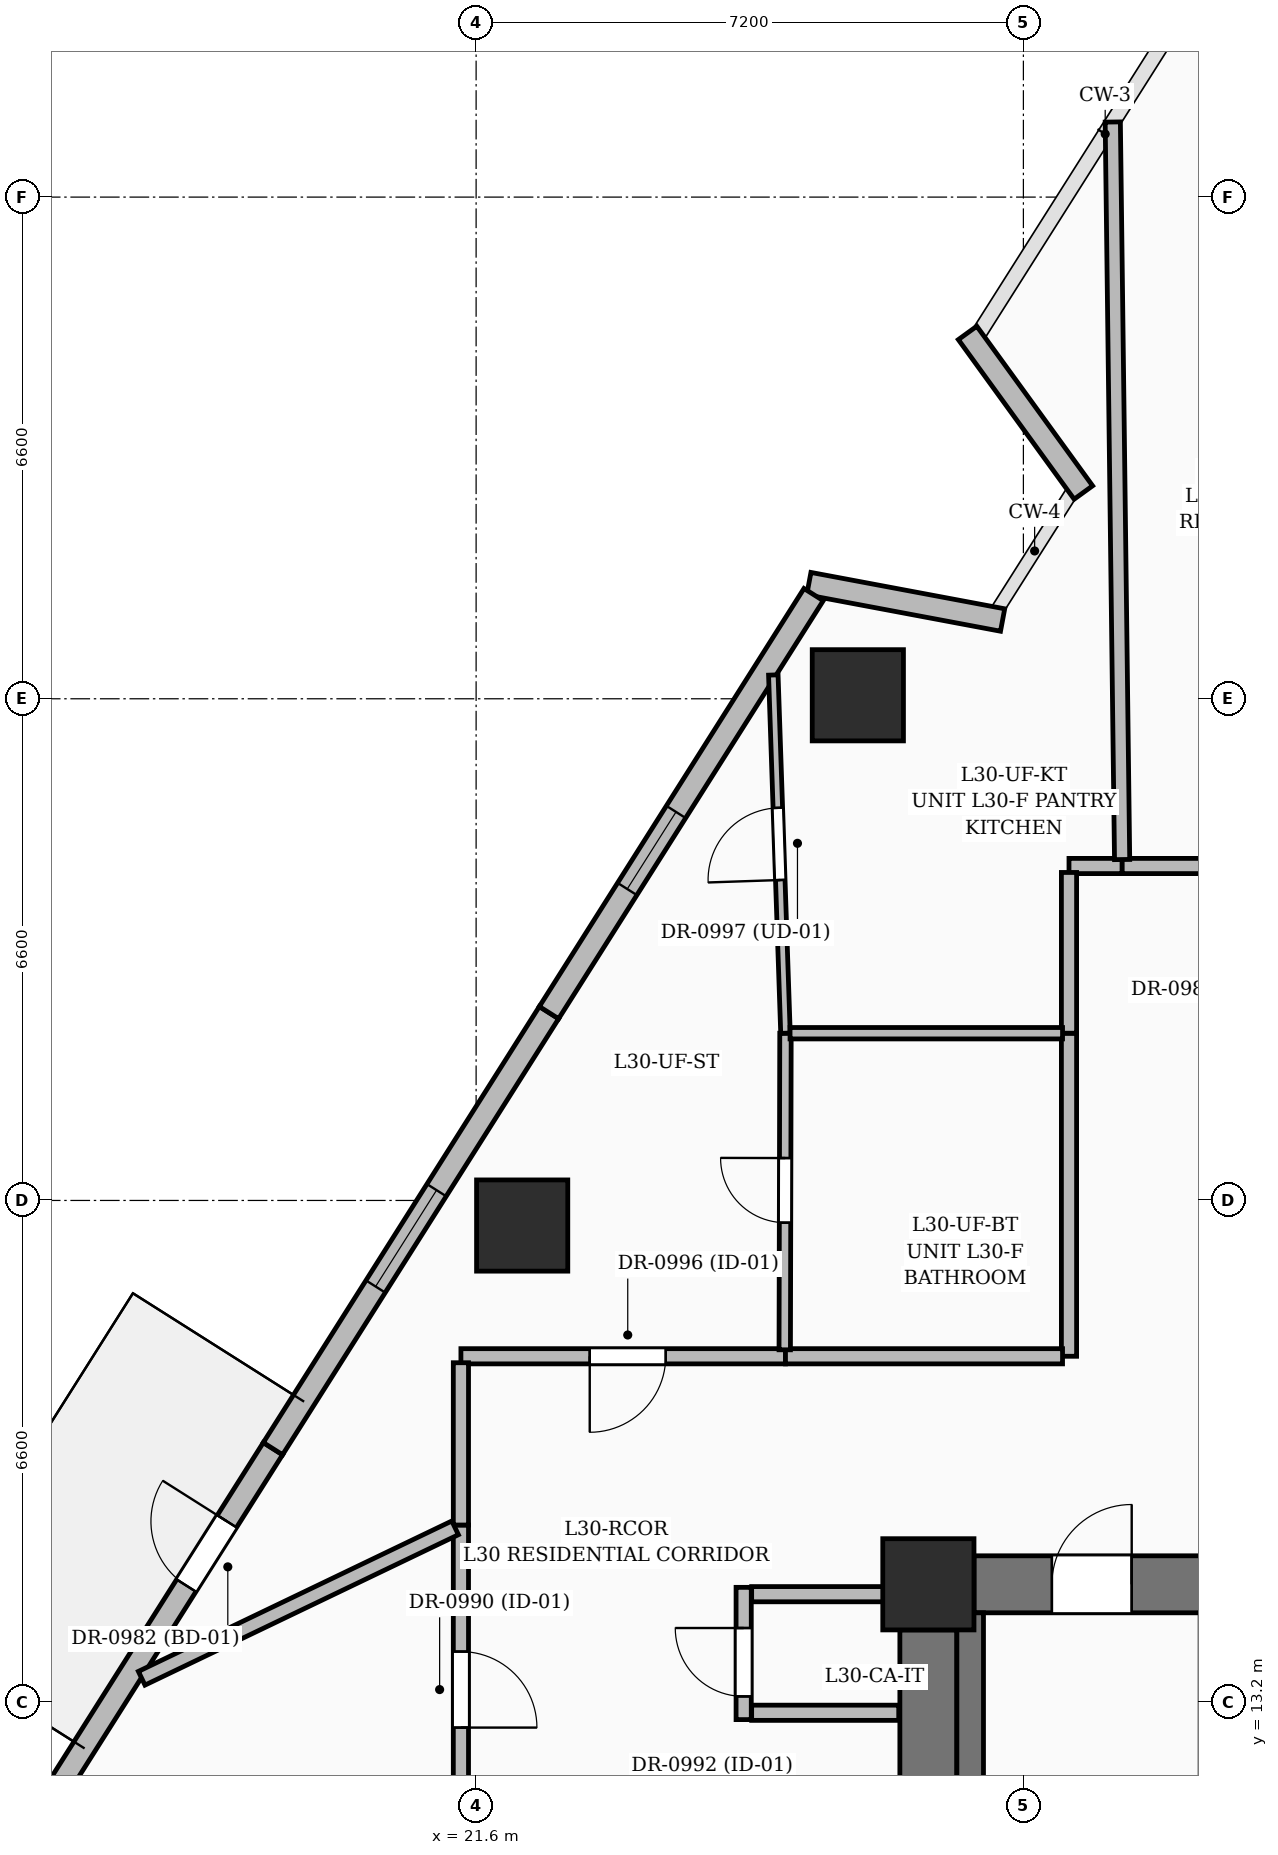
"""IFC4 building model, lengths in metres.
Left out: names, types, materials, properties, quantities, classifications, styles, units other than length and angle.
Written with IfcOpenShell. Run it as: python <this file> out.ifc"""

import sys

from ifc_helpers import new_model, si_unit, direction, frame, frame_2d, origin, origin_2d, place, context, subcontext, project, spatial, rectangle, extrude, element, fill, save


model = new_model("IFC4")
c1 = context("Model", 3, precision=1e-05, world=origin(), true_north=direction((0.0, 1.0)))
c2 = subcontext(c1, "Body", "Model", "MODEL_VIEW")
j1 = project(units=[si_unit("LENGTHUNIT", "METRE"), si_unit("PLANEANGLEUNIT", "RADIAN")], contexts=[c1])
p1 = place(None, origin())
s1 = spatial("IfcSite", under=j1, at=p1, CompositionType="ELEMENT")
p2 = place(p1, origin())
s2 = spatial("IfcBuilding", under=s1, at=p2, CompositionType="ELEMENT")
p3 = place(p2, frame((0.0, 0.0, 121.2)))
s3 = spatial("IfcBuildingStorey", under=s2, at=p3, CompositionType="ELEMENT", Elevation=121.2)
p4 = place(p3, frame((27.55, 14.75, 0.0), z_axis=(0.0, 0.0, 1.0), x_axis=(1.0, 0.0, 0.0)))
e1 = element("IfcColumn", 1, at=p4, inside=s3, PredefinedType="COLUMN", context=c2, shape_type="SweptSolid", body=[
    extrude(rectangle(XDim=1.2, YDim=1.2, at=origin_2d()), origin(), (0.0, 0.0, 1.0), 3.6),
])
p5 = place(p3, frame((28.15, 14.75, 0.0), z_axis=(0.0, 0.0, 1.0), x_axis=(1.0, 0.0, 0.0)))
e2 = element("IfcWall", 2, at=p5, inside=s3, PredefinedType="SHEAR", context=c2, shape_type="SweptSolid", body=[
    extrude(rectangle(XDim=6.4, YDim=0.75, at=frame_2d((3.2, 0.0))), origin(), (0.0, 0.0, 1.0), 3.6),
])
p6 = place(p5, frame((1.025, 0.0, 0.0)))
e3 = element("IfcOpeningElement", 3, at=p6, cuts=e2, PredefinedType="OPENING", context=c2, shape_type="SweptSolid", body=[
    extrude(rectangle(XDim=1.05, YDim=2.15, at=frame_2d((0.525, 1.075))), frame((0.0, 0.385, 0.0), z_axis=(0.0, -1.0, 0.0), x_axis=(1.0, 0.0, 0.0)), (0.0, 0.0, 1.0), 0.77),
])
p7 = place(p5, frame((3.8, 0.0, 0.0)))
e4 = element("IfcOpeningElement", 4, at=p7, cuts=e2, PredefinedType="OPENING", context=c2, shape_type="SweptSolid", body=[
    extrude(rectangle(XDim=1.1, YDim=2.2, at=frame_2d((0.55, 1.1))), frame((0.0, 0.385, 0.0), z_axis=(0.0, -1.0, 0.0), x_axis=(1.0, 0.0, 0.0)), (0.0, 0.0, 1.0), 0.77),
])
p8 = place(p3, frame((27.55, 5.15, 0.0), z_axis=(0.0, 0.0, 1.0), x_axis=(0.0, 1.0, 0.0)))
e5 = element("IfcWall", 5, at=p8, inside=s3, PredefinedType="SHEAR", context=c2, shape_type="SweptSolid", body=[
    extrude(rectangle(XDim=9.0, YDim=0.75, at=frame_2d((4.5, 0.0))), origin(), (0.0, 0.0, 1.0), 3.6),
])
p9 = place(p3, frame((28.1, 5.2, 0.0), z_axis=(0.0, 0.0, 1.0), x_axis=(0.0, 1.0, 0.0)))
e6 = element("IfcWall", 6, at=p9, inside=s3, PredefinedType="SOLIDWALL", context=c2, shape_type="SweptSolid", body=[
    extrude(rectangle(XDim=9.175, YDim=0.35, at=frame_2d((4.587, 0.0))), origin(), (0.0, 0.0, 1.0), 3.6),
])
for number, where, z_axis, x_axis in (
    (7, (26.622, 26.446, 0.0), (0.0, 0.0, 1.0), (1.0, 0.0, 0.0)),
    (8, (22.206, 19.47, 0.0), (0.0, 0.0, 1.0), (1.0, 0.0, 0.0)),
):
    element("IfcColumn", number, at=place(p3, frame(where, z_axis=z_axis, x_axis=x_axis)), inside=s3, PredefinedType="COLUMN", context=c2, shape_type="SweptSolid", body=[
        extrude(rectangle(XDim=1.2, YDim=1.2, at=origin_2d()), origin(), (0.0, 0.0, 1.0), 3.6),
    ])
p10 = place(p3, frame((25.977, 27.915, 0.0), z_axis=(0.0, 0.0, 1.0), x_axis=(0.982835939335, -0.184481750728, 0.0)))
e9 = element("IfcWall", 9, at=p10, inside=s3, PredefinedType="SOLIDWALL", context=c2, shape_type="SweptSolid", body=[
    extrude(rectangle(XDim=2.594, YDim=0.3, at=frame_2d((1.297, 0.0))), origin(), (0.0, 0.0, 1.0), 2.575),
])
p11 = place(p3, frame((29.589, 29.114, 0.0), z_axis=(0.0, 0.0, 1.0), x_axis=(-0.587214315037, 0.809431496926, 0.0)))
e10 = element("IfcWall", 10, at=p11, inside=s3, PredefinedType="SOLIDWALL", context=c2, shape_type="SweptSolid", body=[
    extrude(rectangle(XDim=2.594, YDim=0.3, at=frame_2d((1.297, 0.0))), origin(), (0.0, 0.0, 1.0), 2.575),
])
p12 = place(p3, frame((15.296, 10.798, 0.0), z_axis=(0.0, 0.0, 1.0), x_axis=(0.534877542647, 0.84492959137, 0.0)))
e11 = element("IfcWall", 11, at=p12, inside=s3, PredefinedType="SOLIDWALL", context=c2, shape_type="SweptSolid", body=[
    extrude(rectangle(XDim=6.789, YDim=0.3, at=frame_2d((3.395, 0.0))), origin(), (0.0, 0.0, 1.0), 3.35),
])
p13 = place(p12, frame((4.658, 0.0, 0.0)))
e12 = element("IfcOpeningElement", 12, at=p13, cuts=e11, PredefinedType="OPENING", context=c2, shape_type="SweptSolid", body=[
    extrude(rectangle(XDim=1.0, YDim=2.2, at=frame_2d((0.5, 1.1))), frame((0.0, 0.16, 0.0), z_axis=(0.0, -1.0, 0.0), x_axis=(1.0, 0.0, 0.0)), (0.0, 0.0, 1.0), 0.32),
])
p14 = place(p3, frame((18.927, 16.534, 0.0), z_axis=(0.0, 0.0, 1.0), x_axis=(0.534886962815, 0.844923627916, 0.0)))
e13 = element("IfcWall", 13, at=p14, inside=s3, PredefinedType="SOLIDWALL", context=c2, shape_type="SweptSolid", body=[
    extrude(rectangle(XDim=6.79, YDim=0.3, at=frame_2d((3.395, 0.0))), origin(), (0.0, 0.0, 1.0), 3.35),
])
p15 = place(p14, frame((2.525, 0.0, 0.6)))
e14 = element("IfcOpeningElement", 14, at=p15, cuts=e13, PredefinedType="OPENING", context=c2, shape_type="SweptSolid", body=[
    extrude(rectangle(XDim=1.5, YDim=2.1, at=frame_2d((0.75, 1.05))), frame((0.0, 0.16, 0.0), z_axis=(0.0, -1.0, 0.0), x_axis=(1.0, 0.0, 0.0)), (0.0, 0.0, 1.0), 0.32),
])
p16 = place(p3, frame((22.559, 22.271, 0.0), z_axis=(0.0, 0.0, 1.0), x_axis=(0.534862000087, 0.844939430292, 0.0)))
e15 = element("IfcWall", 15, at=p16, inside=s3, PredefinedType="SOLIDWALL", context=c2, shape_type="SweptSolid", body=[
    extrude(rectangle(XDim=6.509, YDim=0.3, at=frame_2d((3.254, 0.0))), origin(), (0.0, 0.0, 1.0), 3.35),
])
p17 = place(p16, frame((1.925, 0.0, 0.8)))
e16 = element("IfcOpeningElement", 16, at=p17, cuts=e15, PredefinedType="OPENING", context=c2, shape_type="SweptSolid", body=[
    extrude(rectangle(XDim=1.2, YDim=1.8, at=frame_2d((0.6, 0.9))), frame((0.0, 0.16, 0.0), z_axis=(0.0, -1.0, 0.0), x_axis=(1.0, 0.0, 0.0)), (0.0, 0.0, 1.0), 0.32),
])
p18 = place(p3, frame((25.12, 12.97, 0.0), z_axis=(0.0, 0.0, 1.0), x_axis=(0.0, 1.0, 0.0)))
e17 = element("IfcWall", 17, at=p18, inside=s3, PredefinedType="PARTITIONING", context=c2, shape_type="SweptSolid", body=[
    extrude(rectangle(XDim=1.74, YDim=0.2, at=frame_2d((0.87, 0.0))), origin(), (0.0, 0.0, 1.0), 3.35),
])
p19 = place(p18, frame((0.305, 0.0, 0.0)))
e18 = element("IfcOpeningElement", 18, at=p19, cuts=e17, PredefinedType="OPENING", context=c2, shape_type="SweptSolid", body=[
    extrude(rectangle(XDim=0.9, YDim=2.1, at=frame_2d((0.45, 1.05))), frame((0.0, 0.11, 0.0), z_axis=(0.0, -1.0, 0.0), x_axis=(1.0, 0.0, 0.0)), (0.0, 0.0, 1.0), 0.22),
])
for number, where, z_axis, x_axis in (
    (19, (25.225, 14.62, 0.0), (0.0, 0.0, 1.0), (1.0, 0.0, 0.0)),
    (20, (25.225, 13.06, 0.0), (0.0, 0.0, 1.0), (1.0, 0.0, 0.0)),
):
    element("IfcWall", number, at=place(p3, frame(where, z_axis=z_axis, x_axis=x_axis)), inside=s3, PredefinedType="PARTITIONING", context=c2, shape_type="SweptSolid", body=[
        extrude(rectangle(XDim=1.935, YDim=0.2, at=frame_2d((0.967, 0.0))), origin(), (0.0, 0.0, 1.0), 3.35),
    ])
p20 = place(p3, frame((21.4, 15.53, 0.0), z_axis=(0.0, 0.0, 1.0), x_axis=(0.0, -1.0, 0.0)))
e21 = element("IfcWall", 21, at=p20, inside=s3, PredefinedType="PARTITIONING", context=c2, shape_type="SweptSolid", body=[
    extrude(rectangle(XDim=4.33, YDim=0.2, at=frame_2d((2.165, 0.0))), origin(), (0.0, 0.0, 1.0), 2.787),
])
p21 = place(p20, frame((1.665, 0.0, 0.0)))
e22 = element("IfcOpeningElement", 22, at=p21, cuts=e21, PredefinedType="OPENING", context=c2, shape_type="SweptSolid", body=[
    extrude(rectangle(XDim=1.0, YDim=2.2, at=frame_2d((0.5, 1.1))), frame((0.0, 0.11, 0.0), z_axis=(0.0, -1.0, 0.0), x_axis=(1.0, 0.0, 0.0)), (0.0, 0.0, 1.0), 0.22),
])
p22 = place(p3, frame((25.67, 17.75, 0.0), z_axis=(0.0, 0.0, 1.0), x_axis=(-1.0, 0.0, 0.0)))
e23 = element("IfcWall", 23, at=p22, inside=s3, PredefinedType="PARTITIONING", context=c2, shape_type="SweptSolid", body=[
    extrude(rectangle(XDim=4.27, YDim=0.2, at=frame_2d((2.135, 0.0))), origin(), (0.0, 0.0, 1.0), 2.372),
])
p23 = place(p22, frame((1.575, 0.0, 0.0)))
e24 = element("IfcOpeningElement", 24, at=p23, cuts=e23, PredefinedType="OPENING", context=c2, shape_type="SweptSolid", body=[
    extrude(rectangle(XDim=1.0, YDim=2.2, at=frame_2d((0.5, 1.1))), frame((0.0, 0.11, 0.0), z_axis=(0.0, -1.0, 0.0), x_axis=(1.0, 0.0, 0.0)), (0.0, 0.0, 1.0), 0.22),
])
p24 = place(p3, frame((21.4, 17.665, 0.0), z_axis=(0.0, 0.0, 1.0), x_axis=(0.0, -1.0, 0.0)))
e25 = element("IfcWall", 25, at=p24, inside=s3, PredefinedType="PARTITIONING", context=c2, shape_type="SweptSolid", body=[
    extrude(rectangle(XDim=2.135, YDim=0.2, at=frame_2d((1.067, 0.0))), origin(), (0.0, 0.0, 1.0), 2.57),
])
p25 = place(p3, frame((29.4, 22.0, 0.0), z_axis=(0.0, 0.0, 1.0), x_axis=(0.0, -1.0, 0.0)))
e26 = element("IfcWall", 26, at=p25, inside=s3, PredefinedType="PARTITIONING", context=c2, shape_type="SweptSolid", body=[
    extrude(rectangle(XDim=4.25, YDim=0.2, at=frame_2d((2.125, 0.0))), origin(), (0.0, 0.0, 1.0), 2.787),
])
p26 = place(p3, frame((29.315, 17.75, 0.0), z_axis=(0.0, 0.0, 1.0), x_axis=(-1.0, 0.0, 0.0)))
e27 = element("IfcWall", 27, at=p26, inside=s3, PredefinedType="PARTITIONING", context=c2, shape_type="SweptSolid", body=[
    extrude(rectangle(XDim=3.645, YDim=0.2, at=frame_2d((1.823, 0.0))), origin(), (0.0, 0.0, 1.0), 2.787),
])
p27 = place(p3, frame((30.1, 24.2, 0.0), z_axis=(0.0, 0.0, 1.0), x_axis=(-1.0, 0.0, 0.0)))
e28 = element("IfcWall", 28, at=p27, inside=s3, PredefinedType="PARTITIONING", context=c2, shape_type="SweptSolid", body=[
    extrude(rectangle(XDim=0.7, YDim=0.2, at=frame_2d((0.35, 0.0))), origin(), (0.0, 0.0, 1.0), 3.35),
])
p28 = place(p3, frame((29.4, 24.115, 0.0), z_axis=(0.0, 0.0, 1.0), x_axis=(0.0, -1.0, 0.0)))
e29 = element("IfcWall", 29, at=p28, inside=s3, PredefinedType="PARTITIONING", context=c2, shape_type="SweptSolid", body=[
    extrude(rectangle(XDim=2.115, YDim=0.2, at=frame_2d((1.058, 0.0))), origin(), (0.0, 0.0, 1.0), 2.372),
])
p29 = place(p3, frame((31.865, 24.2, 0.0), z_axis=(0.0, 0.0, 1.0), x_axis=(-1.0, 0.0, 0.0)))
e30 = element("IfcWall", 30, at=p29, inside=s3, PredefinedType="PARTITIONING", context=c2, shape_type="SweptSolid", body=[
    extrude(rectangle(XDim=1.765, YDim=0.2, at=frame_2d((0.882, 0.0))), origin(), (0.0, 0.0, 1.0), 2.787),
])
p30 = place(p3, frame((21.324, 15.493, 0.0), z_axis=(0.0, 0.0, 1.0), x_axis=(-0.901578855608, -0.432614802244, 0.0)))
e31 = element("IfcWall", 31, at=p30, inside=s3, PredefinedType="PARTITIONING", context=c2, shape_type="SweptSolid", body=[
    extrude(rectangle(XDim=4.574, YDim=0.2, at=frame_2d((2.287, 0.0))), origin(), (0.0, 0.0, 1.0), 2.57),
])
p31 = place(p3, frame((25.66, 17.835, 0.0), z_axis=(0.0, 0.0, 1.0), x_axis=(0.00234465944, 0.999997251282, 0.0)))
e32 = element("IfcWall", 32, at=p31, inside=s3, PredefinedType="PARTITIONING", context=c2, shape_type="SweptSolid", body=[
    extrude(rectangle(XDim=4.165, YDim=0.15, at=frame_2d((2.083, 0.0))), origin(), (0.0, 0.0, 1.0), 2.787),
])
p32 = place(p31, frame((1.673, 0.0, 0.0)))
e33 = element("IfcOpeningElement", 33, at=p32, cuts=e32, PredefinedType="OPENING", context=c2, shape_type="SweptSolid", body=[
    extrude(rectangle(XDim=0.85, YDim=2.1, at=frame_2d((0.425, 1.05))), frame((0.0, 0.085, 0.0), z_axis=(0.0, -1.0, 0.0), x_axis=(1.0, 0.0, 0.0)), (0.0, 0.0, 1.0), 0.17),
])
p33 = place(p3, frame((25.67, 22.0, 0.0), z_axis=(0.0, 0.0, 1.0), x_axis=(-0.033911276159, 0.999424847274, 0.0)))
e34 = element("IfcWall", 34, at=p33, inside=s3, PredefinedType="PARTITIONING", context=c2, shape_type="SweptSolid", body=[
    extrude(rectangle(XDim=4.716, YDim=0.125, at=frame_2d((2.358, 0.0))), origin(), (0.0, 0.0, 1.0), 2.57),
])
p34 = place(p33, frame((2.017, 0.0, 0.0)))
e35 = element("IfcOpeningElement", 35, at=p34, cuts=e34, PredefinedType="OPENING", context=c2, shape_type="SweptSolid", body=[
    extrude(rectangle(XDim=0.95, YDim=2.2, at=frame_2d((0.475, 1.1))), frame((0.0, 0.072, 0.0), z_axis=(0.0, -1.0, 0.0), x_axis=(1.0, 0.0, 0.0)), (0.0, 0.0, 1.0), 0.145),
])
p35 = place(p3, frame((29.315, 22.0, 0.0), z_axis=(0.0, 0.0, 1.0), x_axis=(-1.0, 0.0, 0.0)))
e36 = element("IfcWall", 36, at=p35, inside=s3, PredefinedType="PARTITIONING", context=c2, shape_type="SweptSolid", body=[
    extrude(rectangle(XDim=3.585, YDim=0.15, at=frame_2d((1.792, 0.0))), origin(), (0.0, 0.0, 1.0), 2.787),
])
p36 = place(p3, frame((30.099, 24.285, 0.0), z_axis=(0.0, 0.0, 1.0), x_axis=(-0.012654984929, 0.999919922472, 0.0)))
e37 = element("IfcWall", 37, at=p36, inside=s3, PredefinedType="PARTITIONING", context=c2, shape_type="SweptSolid", body=[
    extrude(rectangle(XDim=9.704, YDim=0.2, at=frame_2d((4.852, 0.0))), origin(), (0.0, 0.0, 1.0), 2.57),
])
p37 = place(p13, origin())
e38 = element("IfcDoor", 38, at=p37, inside=s3, OperationType="SINGLE_SWING_RIGHT", PredefinedType="DOOR", context=c2, shape_type="SweptSolid", body=[
    extrude(rectangle(XDim=1.0, YDim=2.2, at=frame_2d((0.5, 1.1))), frame((0.0, 0.025, 0.0), z_axis=(0.0, -1.0, 0.0), x_axis=(1.0, 0.0, 0.0)), (0.0, 0.0, 1.0), 0.05),
])
fill(e12, e38)
p38 = place(p15, origin())
e39 = element("IfcWindow", 39, at=p38, inside=s3, PartitioningType="SINGLE_PANEL", PredefinedType="WINDOW", context=c2, shape_type="SweptSolid", body=[
    extrude(rectangle(XDim=1.5, YDim=2.1, at=frame_2d((0.75, 1.05))), frame((0.0, 0.03, 0.0), z_axis=(0.0, -1.0, 0.0), x_axis=(1.0, 0.0, 0.0)), (0.0, 0.0, 1.0), 0.06),
])
fill(e14, e39)
p39 = place(p17, origin())
e40 = element("IfcWindow", 40, at=p39, inside=s3, PartitioningType="SINGLE_PANEL", PredefinedType="WINDOW", context=c2, shape_type="SweptSolid", body=[
    extrude(rectangle(XDim=1.2, YDim=1.8, at=frame_2d((0.6, 0.9))), frame((0.0, 0.03, 0.0), z_axis=(0.0, -1.0, 0.0), x_axis=(1.0, 0.0, 0.0)), (0.0, 0.0, 1.0), 0.06),
])
fill(e16, e40)
p40 = place(p6, origin())
e41 = element("IfcDoor", 41, at=p40, inside=s3, OperationType="SINGLE_SWING_RIGHT", PredefinedType="DOOR", context=c2, shape_type="SweptSolid", body=[
    extrude(rectangle(XDim=1.05, YDim=2.15, at=frame_2d((0.525, 1.075))), frame((0.0, 0.025, 0.0), z_axis=(0.0, -1.0, 0.0), x_axis=(1.0, 0.0, 0.0)), (0.0, 0.0, 1.0), 0.05),
])
fill(e3, e41)
p41 = place(p19, origin())
e42 = element("IfcDoor", 42, at=p41, inside=s3, OperationType="SINGLE_SWING_RIGHT", PredefinedType="DOOR", context=c2, shape_type="SweptSolid", body=[
    extrude(rectangle(XDim=0.9, YDim=2.1, at=frame_2d((0.45, 1.05))), frame((0.0, 0.025, 0.0), z_axis=(0.0, -1.0, 0.0), x_axis=(1.0, 0.0, 0.0)), (0.0, 0.0, 1.0), 0.05),
])
fill(e18, e42)
p42 = place(p21, origin())
e43 = element("IfcDoor", 43, at=p42, inside=s3, OperationType="SINGLE_SWING_RIGHT", PredefinedType="DOOR", context=c2, shape_type="SweptSolid", body=[
    extrude(rectangle(XDim=1.0, YDim=2.2, at=frame_2d((0.5, 1.1))), frame((0.0, 0.025, 0.0), z_axis=(0.0, -1.0, 0.0), x_axis=(1.0, 0.0, 0.0)), (0.0, 0.0, 1.0), 0.05),
])
fill(e22, e43)
p43 = place(p23, origin())
e44 = element("IfcDoor", 44, at=p43, inside=s3, OperationType="SINGLE_SWING_RIGHT", PredefinedType="DOOR", context=c2, shape_type="SweptSolid", body=[
    extrude(rectangle(XDim=1.0, YDim=2.2, at=frame_2d((0.5, 1.1))), frame((0.0, 0.025, 0.0), z_axis=(0.0, -1.0, 0.0), x_axis=(1.0, 0.0, 0.0)), (0.0, 0.0, 1.0), 0.05),
])
fill(e24, e44)
p44 = place(p34, origin())
e45 = element("IfcDoor", 45, at=p44, inside=s3, OperationType="SINGLE_SWING_LEFT", PredefinedType="DOOR", context=c2, shape_type="SweptSolid", body=[
    extrude(rectangle(XDim=0.95, YDim=2.2, at=frame_2d((0.475, 1.1))), frame((0.0, 0.025, 0.0), z_axis=(0.0, -1.0, 0.0), x_axis=(1.0, 0.0, 0.0)), (0.0, 0.0, 1.0), 0.05),
])
fill(e35, e45)
p45 = place(p32, origin())
e46 = element("IfcDoor", 46, at=p45, inside=s3, OperationType="SINGLE_SWING_RIGHT", PredefinedType="DOOR", context=c2, shape_type="SweptSolid", body=[
    extrude(rectangle(XDim=0.85, YDim=2.1, at=frame_2d((0.425, 1.05))), frame((0.0, 0.025, 0.0), z_axis=(0.0, -1.0, 0.0), x_axis=(1.0, 0.0, 0.0)), (0.0, 0.0, 1.0), 0.05),
])
fill(e33, e46)
save(model, sys.argv[1])
